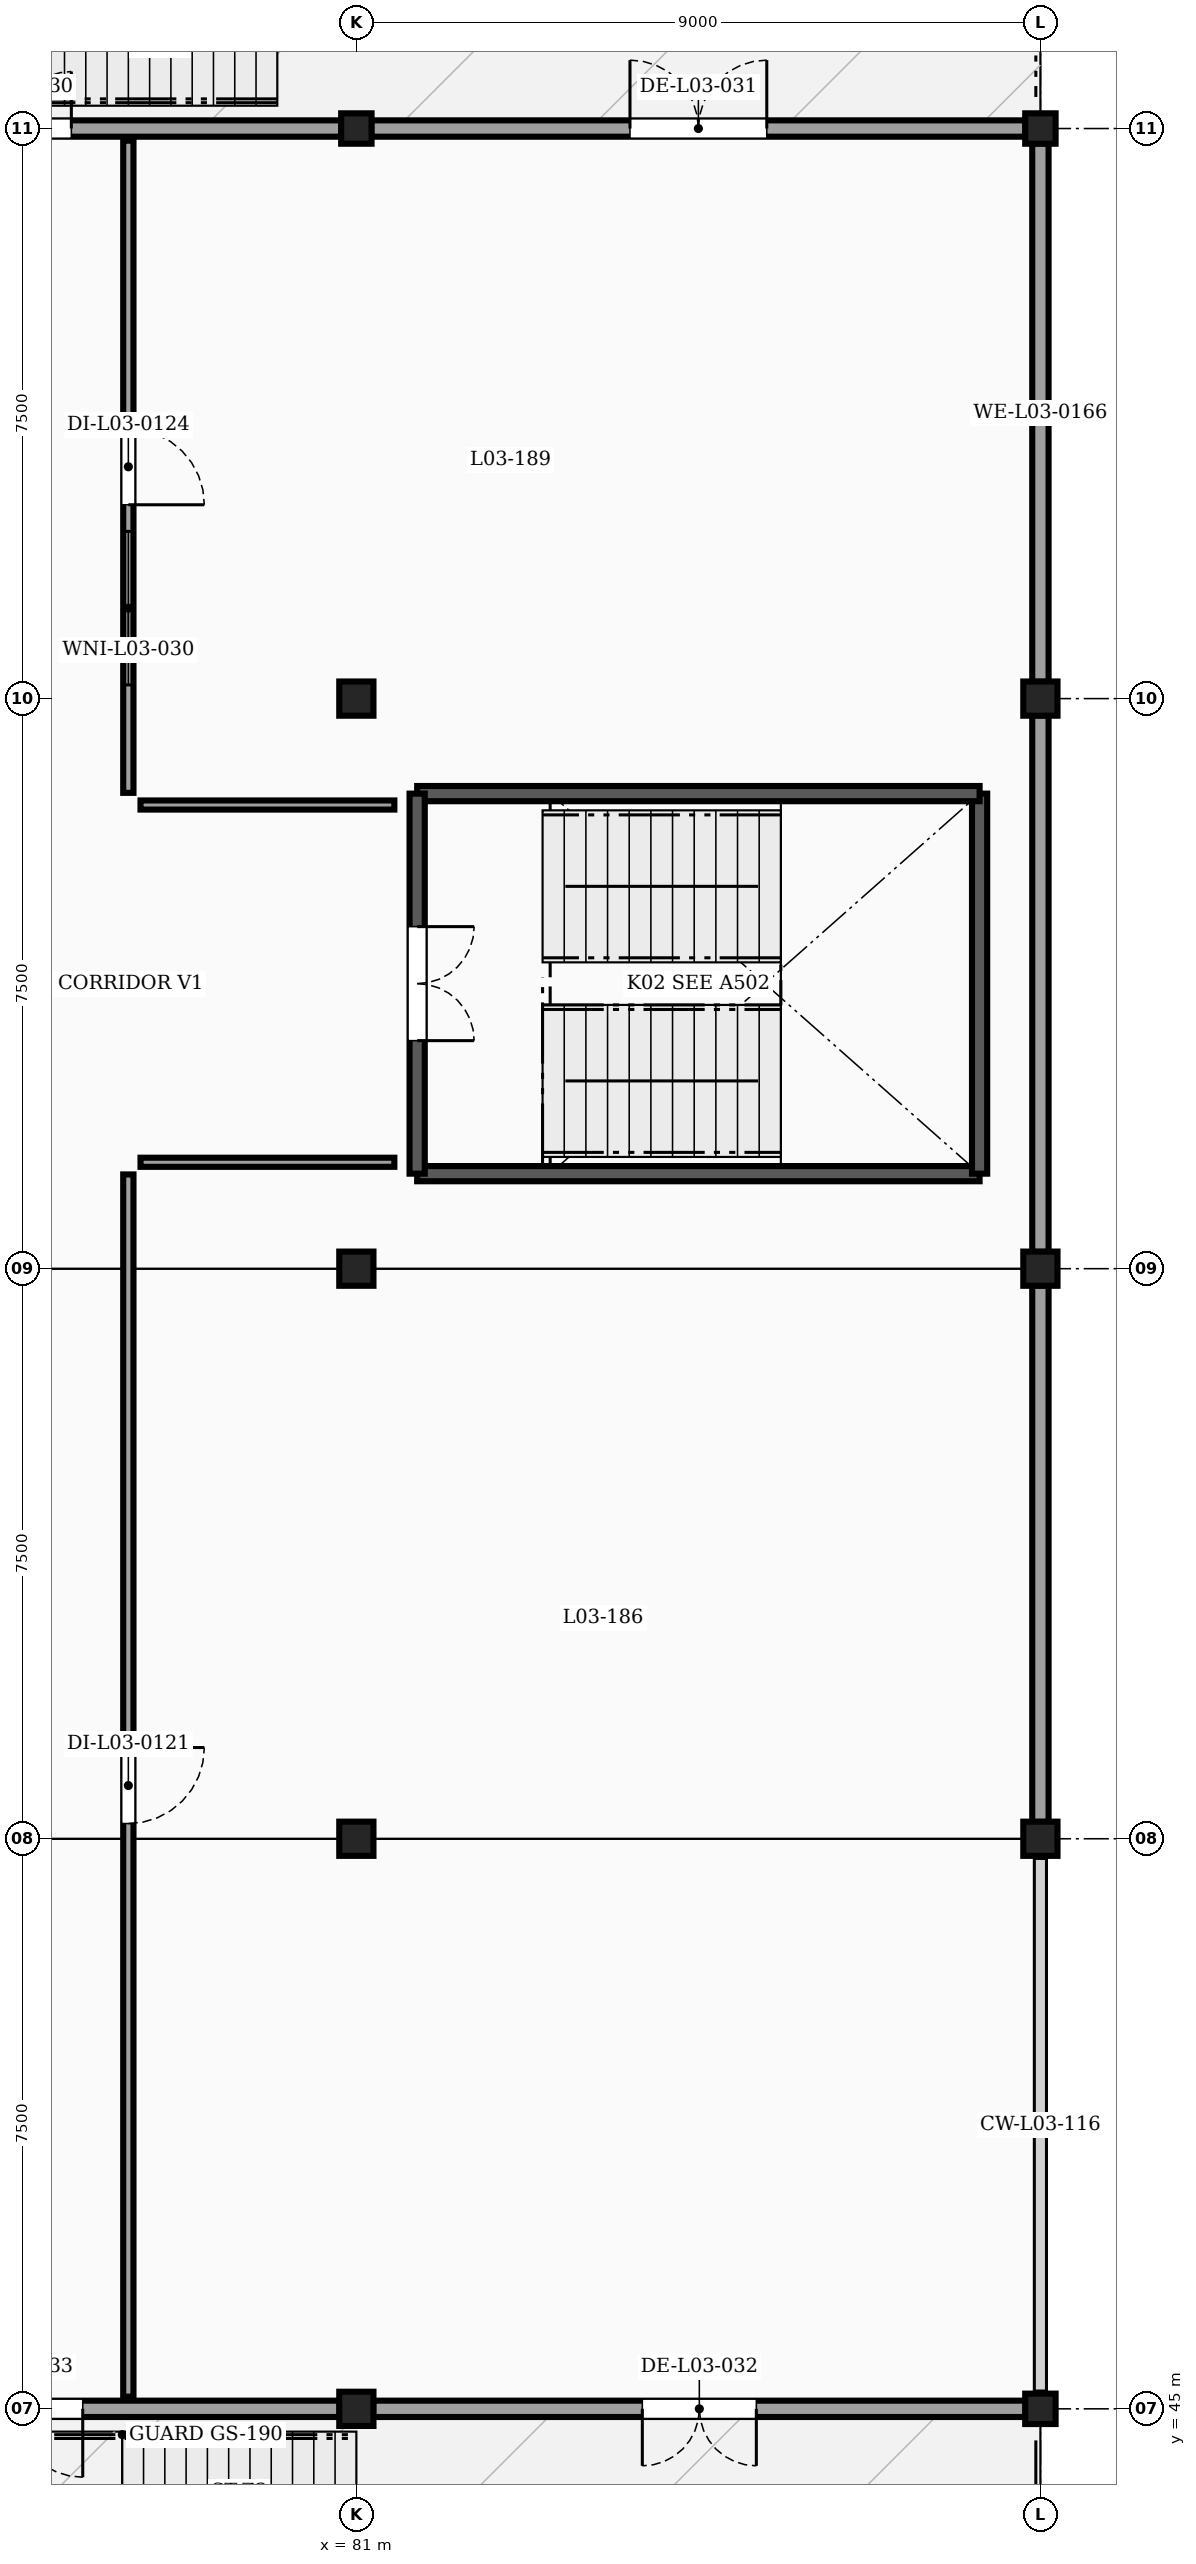
"""IFC4 building model, lengths in metres.
Left out: names, types, materials, properties, quantities, classifications, styles, units other than length and angle.
Written with IfcOpenShell. Run it as: python <this file> out.ifc"""

import sys

from ifc_helpers import new_model, si_unit, direction, frame, frame_2d, origin, origin_2d, place, context, subcontext, project, spatial, rectangle, extrude, element, fill, save


model = new_model("IFC4")
c1 = context("Model", 3, precision=1e-05, world=origin(), true_north=direction((0.0, 1.0)))
c2 = subcontext(c1, "Body", "Model", "MODEL_VIEW")
j1 = project(units=[si_unit("LENGTHUNIT", "METRE"), si_unit("PLANEANGLEUNIT", "RADIAN")], contexts=[c1])
p1 = place(None, origin())
s1 = spatial("IfcSite", under=j1, at=p1, CompositionType="ELEMENT")
p2 = place(p1, origin())
s2 = spatial("IfcBuilding", under=s1, at=p2, CompositionType="ELEMENT")
p3 = place(p2, frame((0.0, 0.0, 12.3)))
s3 = spatial("IfcBuildingStorey", under=s2, at=p3, CompositionType="ELEMENT", Elevation=12.3)
p4 = place(p3, frame((81.0, 45.0, 0.0), z_axis=(0.0, 0.0, 1.0), x_axis=(1.0, 0.0, 0.0)))
e1 = element("IfcColumn", 1, at=p4, inside=s3, PredefinedType="COLUMN", context=c2, shape_type="SweptSolid", body=[
    extrude(rectangle(XDim=0.45, YDim=0.45, at=origin_2d()), origin(), (0.0, 0.0, 1.0), 3.8),
])
p5 = place(p3, frame((90.0, 45.0, 0.0), z_axis=(0.0, 0.0, 1.0), x_axis=(1.0, 0.0, 0.0)))
e2 = element("IfcColumn", 2, at=p5, inside=s3, PredefinedType="COLUMN", context=c2, shape_type="SweptSolid", body=[
    extrude(rectangle(XDim=0.4, YDim=0.4, at=origin_2d()), origin(), (0.0, 0.0, 1.0), 3.8),
])
for number, where, z_axis, x_axis in (
    (3, (81.0, 52.5, 0.0), (0.0, 0.0, 1.0), (1.0, 0.0, 0.0)),
    (4, (90.0, 52.5, 0.0), (0.0, 0.0, 1.0), (1.0, 0.0, 0.0)),
    (5, (81.0, 60.0, 0.0), (0.0, 0.0, 1.0), (1.0, 0.0, 0.0)),
    (6, (90.0, 60.0, 0.0), (0.0, 0.0, 1.0), (1.0, 0.0, 0.0)),
    (7, (81.0, 67.5, 0.0), (0.0, 0.0, 1.0), (1.0, 0.0, 0.0)),
    (8, (90.0, 67.5, 0.0), (0.0, 0.0, 1.0), (1.0, 0.0, 0.0)),
):
    element("IfcColumn", number, at=place(p3, frame(where, z_axis=z_axis, x_axis=x_axis)), inside=s3, PredefinedType="COLUMN", context=c2, shape_type="SweptSolid", body=[
        extrude(rectangle(XDim=0.45, YDim=0.45, at=origin_2d()), origin(), (0.0, 0.0, 1.0), 3.8),
    ])
for number, where, z_axis, x_axis in (
    (9, (81.0, 75.0, 0.0), (0.0, 0.0, 1.0), (1.0, 0.0, 0.0)),
    (10, (90.0, 75.0, 0.0), (0.0, 0.0, 1.0), (1.0, 0.0, 0.0)),
):
    element("IfcColumn", number, at=place(p3, frame(where, z_axis=z_axis, x_axis=x_axis)), inside=s3, PredefinedType="COLUMN", context=c2, shape_type="SweptSolid", body=[
        extrude(rectangle(XDim=0.4, YDim=0.4, at=origin_2d()), origin(), (0.0, 0.0, 1.0), 3.8),
    ])
p6 = place(p3, frame((72.196, 75.0, 0.0), z_axis=(0.0, 0.0, 1.0), x_axis=(1.0, 0.0, 0.0)))
e11 = element("IfcWall", 11, at=p6, inside=s3, PredefinedType="SOLIDWALL", context=c2, shape_type="SweptSolid", body=[
    extrude(rectangle(XDim=8.608, YDim=0.215, at=frame_2d((4.304, 0.0))), origin(), (0.0, 0.0, 1.0), 3.047),
])
p7 = place(p6, frame((3.554, 0.0, 0.0)))
e12 = element("IfcOpeningElement", 12, at=p7, cuts=e11, PredefinedType="OPENING", context=c2, shape_type="SweptSolid", body=[
    extrude(rectangle(XDim=1.5, YDim=2.15, at=frame_2d((0.75, 1.075))), frame((0.0, 0.117, 0.0), z_axis=(0.0, -1.0, 0.0), x_axis=(1.0, 0.0, 0.0)), (0.0, 0.0, 1.0), 0.235),
])
p8 = place(p3, frame((81.196, 75.0, 0.0), z_axis=(0.0, 0.0, 1.0), x_axis=(1.0, 0.0, 0.0)))
e13 = element("IfcWall", 13, at=p8, inside=s3, PredefinedType="SOLIDWALL", context=c2, shape_type="SweptSolid", body=[
    extrude(rectangle(XDim=8.608, YDim=0.215, at=frame_2d((4.304, 0.0))), origin(), (0.0, 0.0, 1.0), 3.047),
])
p9 = place(p8, frame((3.404, 0.0, 0.0)))
e14 = element("IfcOpeningElement", 14, at=p9, cuts=e13, PredefinedType="OPENING", context=c2, shape_type="SweptSolid", body=[
    extrude(rectangle(XDim=1.8, YDim=2.2, at=frame_2d((0.9, 1.1))), frame((0.0, 0.117, 0.0), z_axis=(0.0, -1.0, 0.0), x_axis=(1.0, 0.0, 0.0)), (0.0, 0.0, 1.0), 0.235),
])
p10 = place(p3, frame((90.0, 74.804, 0.0), z_axis=(0.0, 0.0, 1.0), x_axis=(0.0, -1.0, 0.0)))
e15 = element("IfcWall", 15, at=p10, inside=s3, PredefinedType="SOLIDWALL", context=c2, shape_type="SweptSolid", body=[
    extrude(rectangle(XDim=7.083, YDim=0.215, at=frame_2d((3.542, 0.0))), origin(), (0.0, 0.0, 1.0), 3.047),
])
for number, where, z_axis, x_axis in (
    (16, (90.0, 67.279, 0.0), (0.0, 0.0, 1.0), (0.0, -1.0, 0.0)),
    (17, (90.0, 59.779, 0.0), (0.0, 0.0, 1.0), (0.0, -1.0, 0.0)),
):
    element("IfcWall", number, at=place(p3, frame(where, z_axis=z_axis, x_axis=x_axis)), inside=s3, PredefinedType="SOLIDWALL", context=c2, shape_type="SweptSolid", body=[
        extrude(rectangle(XDim=7.058, YDim=0.215, at=frame_2d((3.529, 0.0))), origin(), (0.0, 0.0, 1.0), 2.997),
    ])
p11 = place(p3, frame((89.804, 45.0, 0.0), z_axis=(0.0, 0.0, 1.0), x_axis=(-1.0, 0.0, 0.0)))
e18 = element("IfcWall", 18, at=p11, inside=s3, PredefinedType="SOLIDWALL", context=c2, shape_type="SweptSolid", body=[
    extrude(rectangle(XDim=8.583, YDim=0.215, at=frame_2d((4.292, 0.0))), origin(), (0.0, 0.0, 1.0), 3.047),
])
p12 = place(p11, frame((3.542, 0.0, 0.0)))
e19 = element("IfcOpeningElement", 19, at=p12, cuts=e18, PredefinedType="OPENING", context=c2, shape_type="SweptSolid", body=[
    extrude(rectangle(XDim=1.5, YDim=2.15, at=frame_2d((0.75, 1.075))), frame((0.0, 0.117, 0.0), z_axis=(0.0, -1.0, 0.0), x_axis=(1.0, 0.0, 0.0)), (0.0, 0.0, 1.0), 0.235),
])
p13 = place(p3, frame((80.779, 45.0, 0.0), z_axis=(0.0, 0.0, 1.0), x_axis=(-1.0, 0.0, 0.0)))
e20 = element("IfcWall", 20, at=p13, inside=s3, PredefinedType="SOLIDWALL", context=c2, shape_type="SweptSolid", body=[
    extrude(rectangle(XDim=8.558, YDim=0.215, at=frame_2d((4.279, 0.0))), origin(), (0.0, 0.0, 1.0), 3.047),
])
p14 = place(p13, frame((3.379, 0.0, 0.0)))
e21 = element("IfcOpeningElement", 21, at=p14, cuts=e20, PredefinedType="OPENING", context=c2, shape_type="SweptSolid", body=[
    extrude(rectangle(XDim=1.8, YDim=2.2, at=frame_2d((0.9, 1.1))), frame((0.0, 0.117, 0.0), z_axis=(0.0, -1.0, 0.0), x_axis=(1.0, 0.0, 0.0)), (0.0, 0.0, 1.0), 0.235),
])
p15 = place(p3, frame((81.8, 61.25, 0.0), z_axis=(0.0, 0.0, 1.0), x_axis=(1.0, 0.0, 0.0)))
e22 = element("IfcWall", 22, at=p15, inside=s3, PredefinedType="SHEAR", context=c2, shape_type="SweptSolid", body=[
    extrude(rectangle(XDim=7.4, YDim=0.2, at=frame_2d((3.7, 0.0))), origin(), (0.0, 0.0, 1.0), 3.59),
])
p16 = place(p3, frame((89.2, 61.25, 0.0), z_axis=(0.0, 0.0, 1.0), x_axis=(0.0, 1.0, 0.0)))
e23 = element("IfcWall", 23, at=p16, inside=s3, PredefinedType="SHEAR", context=c2, shape_type="SweptSolid", body=[
    extrude(rectangle(XDim=5.0, YDim=0.2, at=frame_2d((2.5, 0.0))), origin(), (0.0, 0.0, 1.0), 3.59),
])
p17 = place(p3, frame((89.2, 66.25, 0.0), z_axis=(0.0, 0.0, 1.0), x_axis=(-1.0, 0.0, 0.0)))
e24 = element("IfcWall", 24, at=p17, inside=s3, PredefinedType="SHEAR", context=c2, shape_type="SweptSolid", body=[
    extrude(rectangle(XDim=7.4, YDim=0.2, at=frame_2d((3.7, 0.0))), origin(), (0.0, 0.0, 1.0), 3.59),
])
p18 = place(p3, frame((81.8, 66.25, 0.0), z_axis=(0.0, 0.0, 1.0), x_axis=(0.0, -1.0, 0.0)))
e25 = element("IfcWall", 25, at=p18, inside=s3, PredefinedType="SHEAR", context=c2, shape_type="SweptSolid", body=[
    extrude(rectangle(XDim=5.0, YDim=0.2, at=frame_2d((2.5, 0.0))), origin(), (0.0, 0.0, 1.0), 3.59),
])
p19 = place(p18, frame((1.75, 0.0, 0.0)))
e26 = element("IfcOpeningElement", 26, at=p19, cuts=e25, PredefinedType="OPENING", context=c2, shape_type="SweptSolid", body=[
    extrude(rectangle(XDim=1.5, YDim=2.15, at=frame_2d((0.75, 1.075))), frame((0.0, 0.11, 0.0), z_axis=(0.0, -1.0, 0.0), x_axis=(1.0, 0.0, 0.0)), (0.0, 0.0, 1.0), 0.22),
])
p20 = place(p3, frame((81.5, 61.4, 0.0), z_axis=(0.0, 0.0, 1.0), x_axis=(-1.0, 0.0, 0.0)))
e27 = element("IfcWall", 27, at=p20, inside=s3, PredefinedType="PARTITIONING", context=c2, shape_type="SweptSolid", body=[
    extrude(rectangle(XDim=3.34, YDim=0.12, at=frame_2d((1.67, 0.0))), origin(), (0.0, 0.0, 1.0), 3.59),
])
p21 = place(p3, frame((78.0, 61.24, 0.0), z_axis=(0.0, 0.0, 1.0), x_axis=(0.0, -1.0, 0.0)))
e28 = element("IfcWall", 28, at=p21, inside=s3, PredefinedType="PARTITIONING", context=c2, shape_type="SweptSolid", body=[
    extrude(rectangle(XDim=16.08, YDim=0.135, at=frame_2d((8.04, 0.0))), origin(), (0.0, 0.0, 1.0), 3.222),
])
p22 = place(p21, frame((7.54, 0.0, 0.0)))
e29 = element("IfcOpeningElement", 29, at=p22, cuts=e28, PredefinedType="OPENING", context=c2, shape_type="SweptSolid", body=[
    extrude(rectangle(XDim=1.0, YDim=2.15, at=frame_2d((0.5, 1.075))), frame((0.0, 0.077, 0.0), z_axis=(0.0, -1.0, 0.0), x_axis=(1.0, 0.0, 0.0)), (0.0, 0.0, 1.0), 0.155),
])
p23 = place(p3, frame((78.0, 74.84, 0.0), z_axis=(0.0, 0.0, 1.0), x_axis=(0.0, -1.0, 0.0)))
e30 = element("IfcWall", 30, at=p23, inside=s3, PredefinedType="PARTITIONING", context=c2, shape_type="SweptSolid", body=[
    extrude(rectangle(XDim=8.58, YDim=0.135, at=frame_2d((4.29, 0.0))), origin(), (0.0, 0.0, 1.0), 3.222),
])
p24 = place(p23, frame((3.79, 0.0, 0.0)))
e31 = element("IfcOpeningElement", 31, at=p24, cuts=e30, PredefinedType="OPENING", context=c2, shape_type="SweptSolid", body=[
    extrude(rectangle(XDim=1.0, YDim=2.15, at=frame_2d((0.5, 1.075))), frame((0.0, 0.077, 0.0), z_axis=(0.0, -1.0, 0.0), x_axis=(1.0, 0.0, 0.0)), (0.0, 0.0, 1.0), 0.155),
])
p25 = place(p23, frame((5.14, 0.0, 1.02)))
e32 = element("IfcOpeningElement", 32, at=p25, cuts=e30, PredefinedType="OPENING", context=c2, shape_type="SweptSolid", body=[
    extrude(rectangle(XDim=2.02, YDim=1.24, at=frame_2d((1.01, 0.62))), frame((0.0, 0.077, 0.0), z_axis=(0.0, -1.0, 0.0), x_axis=(1.0, 0.0, 0.0)), (0.0, 0.0, 1.0), 0.155),
])
p26 = place(p3, frame((78.16, 66.1, 0.0), z_axis=(0.0, 0.0, 1.0), x_axis=(1.0, 0.0, 0.0)))
e33 = element("IfcWall", 33, at=p26, inside=s3, PredefinedType="PARTITIONING", context=c2, shape_type="SweptSolid", body=[
    extrude(rectangle(XDim=3.34, YDim=0.12, at=frame_2d((1.67, 0.0))), origin(), (0.0, 0.0, 1.0), 3.59),
])
p27 = place(p7, origin())
e34 = element("IfcDoor", 34, at=p27, inside=s3, OperationType="DOUBLE_DOOR_SINGLE_SWING", PredefinedType="DOOR", context=c2, shape_type="SweptSolid", body=[
    extrude(rectangle(XDim=1.5, YDim=2.15, at=frame_2d((0.75, 1.075))), frame((0.0, 0.025, 0.0), z_axis=(0.0, -1.0, 0.0), x_axis=(1.0, 0.0, 0.0)), (0.0, 0.0, 1.0), 0.05),
])
fill(e12, e34)
p28 = place(p9, origin())
e35 = element("IfcDoor", 35, at=p28, inside=s3, OperationType="DOUBLE_DOOR_SINGLE_SWING", PredefinedType="DOOR", context=c2, shape_type="SweptSolid", body=[
    extrude(rectangle(XDim=1.8, YDim=2.2, at=frame_2d((0.9, 1.1))), frame((0.0, 0.025, 0.0), z_axis=(0.0, -1.0, 0.0), x_axis=(1.0, 0.0, 0.0)), (0.0, 0.0, 1.0), 0.05),
])
fill(e14, e35)
p29 = place(p12, origin())
e36 = element("IfcDoor", 36, at=p29, inside=s3, OperationType="DOUBLE_DOOR_SINGLE_SWING", PredefinedType="DOOR", context=c2, shape_type="SweptSolid", body=[
    extrude(rectangle(XDim=1.5, YDim=2.15, at=frame_2d((0.75, 1.075))), frame((0.0, 0.025, 0.0), z_axis=(0.0, -1.0, 0.0), x_axis=(1.0, 0.0, 0.0)), (0.0, 0.0, 1.0), 0.05),
])
fill(e19, e36)
p30 = place(p14, origin())
e37 = element("IfcDoor", 37, at=p30, inside=s3, OperationType="DOUBLE_DOOR_SINGLE_SWING", PredefinedType="DOOR", context=c2, shape_type="SweptSolid", body=[
    extrude(rectangle(XDim=1.8, YDim=2.2, at=frame_2d((0.9, 1.1))), frame((0.0, 0.025, 0.0), z_axis=(0.0, -1.0, 0.0), x_axis=(1.0, 0.0, 0.0)), (0.0, 0.0, 1.0), 0.05),
])
fill(e21, e37)
p31 = place(p19, origin())
e38 = element("IfcDoor", 38, at=p31, inside=s3, OperationType="DOUBLE_DOOR_SINGLE_SWING", PredefinedType="DOOR", context=c2, shape_type="SweptSolid", body=[
    extrude(rectangle(XDim=1.5, YDim=2.15, at=frame_2d((0.75, 1.075))), frame((0.0, 0.025, 0.0), z_axis=(0.0, -1.0, 0.0), x_axis=(1.0, 0.0, 0.0)), (0.0, 0.0, 1.0), 0.05),
])
fill(e26, e38)
p32 = place(p22, origin())
e39 = element("IfcDoor", 39, at=p32, inside=s3, OperationType="SINGLE_SWING_LEFT", PredefinedType="DOOR", context=c2, shape_type="SweptSolid", body=[
    extrude(rectangle(XDim=1.0, YDim=2.15, at=frame_2d((0.5, 1.075))), frame((0.0, 0.025, 0.0), z_axis=(0.0, -1.0, 0.0), x_axis=(1.0, 0.0, 0.0)), (0.0, 0.0, 1.0), 0.05),
])
fill(e29, e39)
p33 = place(p24, origin())
e40 = element("IfcDoor", 40, at=p33, inside=s3, OperationType="SINGLE_SWING_RIGHT", PredefinedType="DOOR", context=c2, shape_type="SweptSolid", body=[
    extrude(rectangle(XDim=1.0, YDim=2.15, at=frame_2d((0.5, 1.075))), frame((0.0, 0.025, 0.0), z_axis=(0.0, -1.0, 0.0), x_axis=(1.0, 0.0, 0.0)), (0.0, 0.0, 1.0), 0.05),
])
fill(e31, e40)
p34 = place(p25, origin())
e41 = element("IfcWindow", 41, at=p34, inside=s3, PartitioningType="DOUBLE_PANEL_VERTICAL", PredefinedType="WINDOW", context=c2, shape_type="SweptSolid", body=[
    extrude(rectangle(XDim=2.02, YDim=1.24, at=frame_2d((1.01, 0.62))), frame((0.0, 0.03, 0.0), z_axis=(0.0, -1.0, 0.0), x_axis=(1.0, 0.0, 0.0)), (0.0, 0.0, 1.0), 0.06),
])
fill(e32, e41)
save(model, sys.argv[1])
